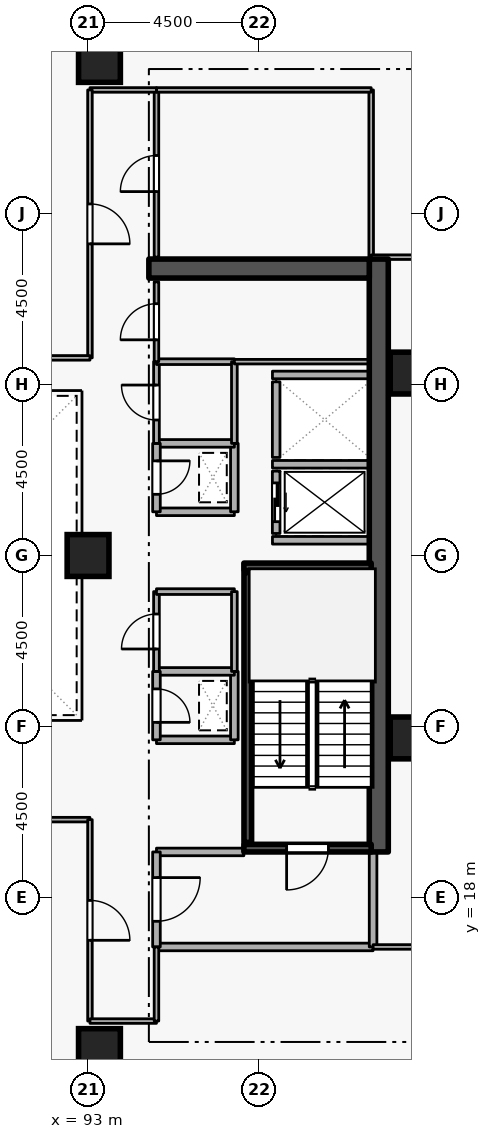
"""IFC4 building model, lengths in metres.
Left out: names, types, materials, properties, quantities, classifications, styles, units other than length and angle.
Written with IfcOpenShell. Run it as: python <this file> out.ifc"""

import sys

from ifc_helpers import new_model, si_unit, direction, frame, frame_2d, origin, origin_2d, place, context, subcontext, project, spatial, rectangle, extrude, element, fill, save


model = new_model("IFC4")
c1 = context("Model", 3, precision=1e-05, world=origin(), true_north=direction((0.0, 1.0)))
c2 = subcontext(c1, "Body", "Model", "MODEL_VIEW")
j1 = project(units=[si_unit("LENGTHUNIT", "METRE"), si_unit("PLANEANGLEUNIT", "RADIAN")], contexts=[c1])
p1 = place(None, origin())
s1 = spatial("IfcSite", under=j1, at=p1, CompositionType="ELEMENT")
p2 = place(p1, origin())
s2 = spatial("IfcBuilding", under=s1, at=p2, CompositionType="ELEMENT")
p3 = place(p2, frame((0.0, 0.0, 156.3)))
s3 = spatial("IfcBuildingStorey", under=s2, at=p3, CompositionType="ELEMENT", Elevation=156.3)
p4 = place(p3, frame((100.65, 19.2, 0.0), z_axis=(0.0, 0.0, 1.0), x_axis=(0.0, 1.0, 0.0)))
e1 = element("IfcWall", 1, at=p4, inside=s3, PredefinedType="SHEAR", context=c2, shape_type="SweptSolid", body=[
    extrude(rectangle(XDim=15.6, YDim=0.5, at=frame_2d((7.8, 0.0))), origin(), (0.0, 0.0, 1.0), 3.6),
])
p5 = place(p3, frame((94.6, 34.55, 0.0), z_axis=(0.0, 0.0, 1.0), x_axis=(1.0, 0.0, 0.0)))
e2 = element("IfcWall", 2, at=p5, inside=s3, PredefinedType="SHEAR", context=c2, shape_type="SweptSolid", body=[
    extrude(rectangle(XDim=5.8, YDim=0.5, at=frame_2d((2.9, 0.0))), origin(), (0.0, 0.0, 1.0), 3.6),
])
for number, where, z_axis, x_axis in (
    (3, (93.3, 14.0, 0.0), (0.0, 0.0, 1.0), (1.0, 0.0, 0.0)),
    (4, (93.3, 40.0, 0.0), (0.0, 0.0, 1.0), (1.0, 0.0, 0.0)),
    (5, (101.5, 22.2, 0.0), (0.0, 0.0, 1.0), (1.0, 0.0, 0.0)),
    (6, (101.5, 31.8, 0.0), (0.0, 0.0, 1.0), (1.0, 0.0, 0.0)),
    (7, (93.0, 27.0, 0.0), (0.0, 0.0, 1.0), (1.0, 0.0, 0.0)),
):
    element("IfcColumn", number, at=place(p3, frame(where, z_axis=z_axis, x_axis=x_axis)), inside=s3, PredefinedType="COLUMN", context=c2, shape_type="SweptSolid", body=[
        extrude(rectangle(XDim=1.1, YDim=1.1, at=origin_2d()), origin(), (0.0, 0.0, 1.0), 3.6),
    ])
p6 = place(p3, frame((97.95, 29.22, 0.0), z_axis=(0.0, 0.0, 1.0), x_axis=(0.0, -1.0, 0.0)))
e8 = element("IfcWall", 8, at=p6, inside=s3, PredefinedType="STANDARD", context=c2, shape_type="SweptSolid", body=[
    extrude(rectangle(XDim=1.64, YDim=0.2, at=frame_2d((0.82, 0.0))), origin(), (0.0, 0.0, 1.0), 3.34),
])
p7 = place(p6, frame((0.31, 0.0, 0.0)))
e9 = element("IfcOpeningElement", 9, at=p7, cuts=e8, PredefinedType="OPENING", context=c2, shape_type="SweptSolid", body=[
    extrude(rectangle(XDim=1.02, YDim=2.06, at=frame_2d((0.51, 1.03))), frame((0.0, 0.11, 0.0), z_axis=(0.0, -1.0, 0.0), x_axis=(1.0, 0.0, 0.0)), (0.0, 0.0, 1.0), 0.22),
])
p8 = place(p3, frame((97.95, 31.57, 0.0), z_axis=(0.0, 0.0, 1.0), x_axis=(0.0, -1.0, 0.0)))
e10 = element("IfcWall", 10, at=p8, inside=s3, PredefinedType="STANDARD", context=c2, shape_type="SweptSolid", body=[
    extrude(rectangle(XDim=1.99, YDim=0.2, at=frame_2d((0.995, 0.0))), origin(), (0.0, 0.0, 1.0), 3.34),
])
for number, where, z_axis, x_axis in (
    (11, (97.852, 29.4, 0.0), (0.0, 0.0, 1.0), (1.0, 0.0, 0.0)),
    (12, (97.852, 27.4, 0.0), (0.0, 0.0, 1.0), (1.0, 0.0, 0.0)),
    (13, (97.852, 31.75, 0.0), (0.0, 0.0, 1.0), (1.0, 0.0, 0.0)),
):
    element("IfcWall", number, at=place(p3, frame(where, z_axis=z_axis, x_axis=x_axis)), inside=s3, PredefinedType="STANDARD", context=c2, shape_type="SweptSolid", body=[
        extrude(rectangle(XDim=2.536, YDim=0.2, at=frame_2d((1.268, 0.0))), origin(), (0.0, 0.0, 1.0), 3.34),
    ])
p9 = place(p3, frame((100.45, 19.3, 0.0), z_axis=(0.0, 0.0, 1.0), x_axis=(-1.0, 0.0, 0.0)))
e14 = element("IfcWall", 14, at=p9, inside=s3, PredefinedType="SHEAR", context=c2, shape_type="SweptSolid", body=[
    extrude(rectangle(XDim=3.35, YDim=0.2, at=frame_2d((1.675, 0.0))), origin(), (0.0, 0.0, 1.0), 3.6),
])
p10 = place(p9, frame((1.125, 0.0, 0.0)))
e15 = element("IfcOpeningElement", 15, at=p10, cuts=e14, PredefinedType="OPENING", context=c2, shape_type="SweptSolid", body=[
    extrude(rectangle(XDim=1.1, YDim=2.1, at=frame_2d((0.55, 1.05))), frame((0.0, 0.11, 0.0), z_axis=(0.0, -1.0, 0.0), x_axis=(1.0, 0.0, 0.0)), (0.0, 0.0, 1.0), 0.22),
])
p11 = place(p3, frame((97.1, 26.7, 0.0), z_axis=(0.0, 0.0, 1.0), x_axis=(1.0, 0.0, 0.0)))
e16 = element("IfcWall", 16, at=p11, inside=s3, PredefinedType="SHEAR", context=c2, shape_type="SweptSolid", body=[
    extrude(rectangle(XDim=3.35, YDim=0.2, at=frame_2d((1.675, 0.0))), origin(), (0.0, 0.0, 1.0), 3.6),
])
p12 = place(p3, frame((97.203, 26.55, 0.0), z_axis=(0.0, 0.0, 1.0), x_axis=(0.0, -1.0, 0.0)))
e17 = element("IfcWall", 17, at=p12, inside=s3, PredefinedType="SHEAR", context=c2, shape_type="SweptSolid", body=[
    extrude(rectangle(XDim=7.1, YDim=0.2, at=frame_2d((3.55, 0.0))), origin(), (0.0, 0.0, 1.0), 3.6),
])
p13 = place(p3, frame((94.8, 16.7, 0.0), z_axis=(0.0, 0.0, 1.0), x_axis=(1.0, 0.0, 0.0)))
e18 = element("IfcWall", 18, at=p13, inside=s3, PredefinedType="STANDARD", context=c2, shape_type="SweptSolid", body=[
    extrude(rectangle(XDim=5.7, YDim=0.2, at=frame_2d((2.85, 0.0))), origin(), (0.0, 0.0, 1.0), 3.34),
])
p14 = place(p3, frame((100.5, 16.7, 0.0), z_axis=(0.0, 0.0, 1.0), x_axis=(0.0, 1.0, 0.0)))
e19 = element("IfcWall", 19, at=p14, inside=s3, PredefinedType="STANDARD", context=c2, shape_type="SweptSolid", body=[
    extrude(rectangle(XDim=2.5, YDim=0.2, at=frame_2d((1.25, 0.0))), origin(), (0.0, 0.0, 1.0), 3.34),
])
p15 = place(p3, frame((97.1, 19.2, 0.0), z_axis=(0.0, 0.0, 1.0), x_axis=(-1.0, 0.0, 0.0)))
e20 = element("IfcWall", 20, at=p15, inside=s3, PredefinedType="STANDARD", context=c2, shape_type="SweptSolid", body=[
    extrude(rectangle(XDim=2.3, YDim=0.2, at=frame_2d((1.15, 0.0))), origin(), (0.0, 0.0, 1.0), 2.545),
])
p16 = place(p3, frame((94.8, 19.2, 0.0), z_axis=(0.0, 0.0, 1.0), x_axis=(0.0, -1.0, 0.0)))
e21 = element("IfcWall", 21, at=p16, inside=s3, PredefinedType="STANDARD", context=c2, shape_type="SweptSolid", body=[
    extrude(rectangle(XDim=2.5, YDim=0.2, at=frame_2d((1.25, 0.0))), origin(), (0.0, 0.0, 1.0), 3.34),
])
p17 = place(p16, frame((0.675, 0.0, 0.0)))
e22 = element("IfcOpeningElement", 22, at=p17, cuts=e21, PredefinedType="OPENING", context=c2, shape_type="SweptSolid", body=[
    extrude(rectangle(XDim=1.15, YDim=2.1, at=frame_2d((0.575, 1.05))), frame((0.0, 0.11, 0.0), z_axis=(0.0, -1.0, 0.0), x_axis=(1.0, 0.0, 0.0)), (0.0, 0.0, 1.0), 0.22),
])
p18 = place(p3, frame((94.8, 28.15, 0.0), z_axis=(0.0, 0.0, 1.0), x_axis=(1.0, 0.0, 0.0)))
e23 = element("IfcWall", 23, at=p18, inside=s3, PredefinedType="STANDARD", context=c2, shape_type="SweptSolid", body=[
    extrude(rectangle(XDim=2.05, YDim=0.2, at=frame_2d((1.025, 0.0))), origin(), (0.0, 0.0, 1.0), 3.34),
])
p19 = place(p3, frame((96.85, 28.15, 0.0), z_axis=(0.0, 0.0, 1.0), x_axis=(0.0, 1.0, 0.0)))
e24 = element("IfcWall", 24, at=p19, inside=s3, PredefinedType="STANDARD", context=c2, shape_type="SweptSolid", body=[
    extrude(rectangle(XDim=1.8, YDim=0.2, at=frame_2d((0.9, 0.0))), origin(), (0.0, 0.0, 1.0), 3.34),
])
p20 = place(p3, frame((96.85, 29.95, 0.0), z_axis=(0.0, 0.0, 1.0), x_axis=(-1.0, 0.0, 0.0)))
e25 = element("IfcWall", 25, at=p20, inside=s3, PredefinedType="STANDARD", context=c2, shape_type="SweptSolid", body=[
    extrude(rectangle(XDim=2.05, YDim=0.2, at=frame_2d((1.025, 0.0))), origin(), (0.0, 0.0, 1.0), 3.34),
])
p21 = place(p3, frame((94.8, 29.95, 0.0), z_axis=(0.0, 0.0, 1.0), x_axis=(0.0, -1.0, 0.0)))
e26 = element("IfcWall", 26, at=p21, inside=s3, PredefinedType="STANDARD", context=c2, shape_type="SweptSolid", body=[
    extrude(rectangle(XDim=1.8, YDim=0.2, at=frame_2d((0.9, 0.0))), origin(), (0.0, 0.0, 1.0), 3.34),
])
p22 = place(p21, frame((0.46, 0.0, 0.0)))
e27 = element("IfcOpeningElement", 27, at=p22, cuts=e26, PredefinedType="OPENING", context=c2, shape_type="SweptSolid", body=[
    extrude(rectangle(XDim=0.88, YDim=2.04, at=frame_2d((0.44, 1.02))), frame((0.0, 0.11, 0.0), z_axis=(0.0, -1.0, 0.0), x_axis=(1.0, 0.0, 0.0)), (0.0, 0.0, 1.0), 0.22),
])
p23 = place(p3, frame((94.8, 22.15, 0.0), z_axis=(0.0, 0.0, 1.0), x_axis=(1.0, 0.0, 0.0)))
e28 = element("IfcWall", 28, at=p23, inside=s3, PredefinedType="STANDARD", context=c2, shape_type="SweptSolid", body=[
    extrude(rectangle(XDim=2.05, YDim=0.2, at=frame_2d((1.025, 0.0))), origin(), (0.0, 0.0, 1.0), 3.34),
])
p24 = place(p3, frame((96.85, 22.15, 0.0), z_axis=(0.0, 0.0, 1.0), x_axis=(0.0, 1.0, 0.0)))
e29 = element("IfcWall", 29, at=p24, inside=s3, PredefinedType="STANDARD", context=c2, shape_type="SweptSolid", body=[
    extrude(rectangle(XDim=1.8, YDim=0.2, at=frame_2d((0.9, 0.0))), origin(), (0.0, 0.0, 1.0), 3.34),
])
p25 = place(p3, frame((96.85, 23.95, 0.0), z_axis=(0.0, 0.0, 1.0), x_axis=(-1.0, 0.0, 0.0)))
e30 = element("IfcWall", 30, at=p25, inside=s3, PredefinedType="STANDARD", context=c2, shape_type="SweptSolid", body=[
    extrude(rectangle(XDim=2.05, YDim=0.2, at=frame_2d((1.025, 0.0))), origin(), (0.0, 0.0, 1.0), 3.34),
])
p26 = place(p3, frame((94.8, 23.95, 0.0), z_axis=(0.0, 0.0, 1.0), x_axis=(0.0, -1.0, 0.0)))
e31 = element("IfcWall", 31, at=p26, inside=s3, PredefinedType="STANDARD", context=c2, shape_type="SweptSolid", body=[
    extrude(rectangle(XDim=1.8, YDim=0.2, at=frame_2d((0.9, 0.0))), origin(), (0.0, 0.0, 1.0), 3.34),
])
p27 = place(p26, frame((0.46, 0.0, 0.0)))
e32 = element("IfcOpeningElement", 32, at=p27, cuts=e31, PredefinedType="OPENING", context=c2, shape_type="SweptSolid", body=[
    extrude(rectangle(XDim=0.88, YDim=2.04, at=frame_2d((0.44, 1.02))), frame((0.0, 0.11, 0.0), z_axis=(0.0, -1.0, 0.0), x_axis=(1.0, 0.0, 0.0)), (0.0, 0.0, 1.0), 0.22),
])
p28 = place(p3, frame((94.8, 23.95, 0.0), z_axis=(0.0, 0.0, 1.0), x_axis=(0.0, 1.0, 0.0)))
e33 = element("IfcWall", 33, at=p28, inside=s3, PredefinedType="PARTITIONING", context=c2, shape_type="SweptSolid", body=[
    extrude(rectangle(XDim=2.1, YDim=0.15, at=frame_2d((1.05, 0.0))), origin(), (0.0, 0.0, 1.0), 3.34),
])
p29 = place(p28, frame((0.59, 0.0, 0.0)))
e34 = element("IfcOpeningElement", 34, at=p29, cuts=e33, PredefinedType="OPENING", context=c2, shape_type="SweptSolid", body=[
    extrude(rectangle(XDim=0.92, YDim=2.08, at=frame_2d((0.46, 1.04))), frame((0.0, 0.085, 0.0), z_axis=(0.0, -1.0, 0.0), x_axis=(1.0, 0.0, 0.0)), (0.0, 0.0, 1.0), 0.17),
])
p30 = place(p3, frame((94.8, 26.05, 0.0), z_axis=(0.0, 0.0, 1.0), x_axis=(1.0, 0.0, 0.0)))
e35 = element("IfcWall", 35, at=p30, inside=s3, PredefinedType="PARTITIONING", context=c2, shape_type="SweptSolid", body=[
    extrude(rectangle(XDim=2.05, YDim=0.15, at=frame_2d((1.025, 0.0))), origin(), (0.0, 0.0, 1.0), 3.34),
])
p31 = place(p3, frame((96.85, 26.05, 0.0), z_axis=(0.0, 0.0, 1.0), x_axis=(0.0, -1.0, 0.0)))
e36 = element("IfcWall", 36, at=p31, inside=s3, PredefinedType="PARTITIONING", context=c2, shape_type="SweptSolid", body=[
    extrude(rectangle(XDim=2.1, YDim=0.15, at=frame_2d((1.05, 0.0))), origin(), (0.0, 0.0, 1.0), 3.34),
])
p32 = place(p3, frame((94.8, 29.95, 0.0), z_axis=(0.0, 0.0, 1.0), x_axis=(0.0, 1.0, 0.0)))
e37 = element("IfcWall", 37, at=p32, inside=s3, PredefinedType="PARTITIONING", context=c2, shape_type="SweptSolid", body=[
    extrude(rectangle(XDim=2.15, YDim=0.15, at=frame_2d((1.075, 0.0))), origin(), (0.0, 0.0, 1.0), 3.34),
])
p33 = place(p32, frame((0.615, 0.0, 0.0)))
e38 = element("IfcOpeningElement", 38, at=p33, cuts=e37, PredefinedType="OPENING", context=c2, shape_type="SweptSolid", body=[
    extrude(rectangle(XDim=0.92, YDim=2.08, at=frame_2d((0.46, 1.04))), frame((0.0, 0.085, 0.0), z_axis=(0.0, -1.0, 0.0), x_axis=(1.0, 0.0, 0.0)), (0.0, 0.0, 1.0), 0.17),
])
p34 = place(p3, frame((94.8, 32.1, 0.0), z_axis=(0.0, 0.0, 1.0), x_axis=(1.0, 0.0, 0.0)))
e39 = element("IfcWall", 39, at=p34, inside=s3, PredefinedType="PARTITIONING", context=c2, shape_type="SweptSolid", body=[
    extrude(rectangle(XDim=2.05, YDim=0.15, at=frame_2d((1.025, 0.0))), origin(), (0.0, 0.0, 1.0), 3.34),
])
p35 = place(p3, frame((96.85, 32.1, 0.0), z_axis=(0.0, 0.0, 1.0), x_axis=(0.0, -1.0, 0.0)))
e40 = element("IfcWall", 40, at=p35, inside=s3, PredefinedType="PARTITIONING", context=c2, shape_type="SweptSolid", body=[
    extrude(rectangle(XDim=2.15, YDim=0.15, at=frame_2d((1.075, 0.0))), origin(), (0.0, 0.0, 1.0), 3.34),
])
p36 = place(p3, frame((94.8, 32.1, 0.0), z_axis=(0.0, 0.0, 1.0), x_axis=(0.0, 1.0, 0.0)))
e41 = element("IfcWall", 41, at=p36, inside=s3, PredefinedType="PARTITIONING", context=c2, shape_type="SweptSolid", body=[
    extrude(rectangle(XDim=2.1, YDim=0.12, at=frame_2d((1.05, 0.0))), origin(), (0.0, 0.0, 1.0), 3.34),
])
p37 = place(p36, frame((0.575, 0.0, 0.0)))
e42 = element("IfcOpeningElement", 42, at=p37, cuts=e41, PredefinedType="OPENING", context=c2, shape_type="SweptSolid", body=[
    extrude(rectangle(XDim=0.95, YDim=2.1, at=frame_2d((0.475, 1.05))), frame((0.0, 0.07, 0.0), z_axis=(0.0, -1.0, 0.0), x_axis=(1.0, 0.0, 0.0)), (0.0, 0.0, 1.0), 0.14),
])
p38 = place(p3, frame((100.4, 32.1, 0.0), z_axis=(0.0, 0.0, 1.0), x_axis=(-1.0, 0.0, 0.0)))
e43 = element("IfcWall", 43, at=p38, inside=s3, PredefinedType="PARTITIONING", context=c2, shape_type="SweptSolid", body=[
    extrude(rectangle(XDim=3.55, YDim=0.12, at=frame_2d((1.775, 0.0))), origin(), (0.0, 0.0, 1.0), 3.34),
])
p39 = place(p3, frame((100.45, 39.25, 0.0), z_axis=(0.0, 0.0, 1.0), x_axis=(0.0, -1.0, 0.0)))
e44 = element("IfcWall", 44, at=p39, inside=s3, PredefinedType="PARTITIONING", context=c2, shape_type="SweptSolid", body=[
    extrude(rectangle(XDim=4.4, YDim=0.12, at=frame_2d((2.2, 0.0))), origin(), (0.0, 0.0, 1.0), 3.34),
])
p40 = place(p3, frame((94.8, 34.85, 0.0), z_axis=(0.0, 0.0, 1.0), x_axis=(0.0, 1.0, 0.0)))
e45 = element("IfcWall", 45, at=p40, inside=s3, PredefinedType="PARTITIONING", context=c2, shape_type="SweptSolid", body=[
    extrude(rectangle(XDim=4.4, YDim=0.12, at=frame_2d((2.2, 0.0))), origin(), (0.0, 0.0, 1.0), 3.34),
])
p41 = place(p40, frame((1.725, 0.0, 0.0)))
e46 = element("IfcOpeningElement", 46, at=p41, cuts=e45, PredefinedType="OPENING", context=c2, shape_type="SweptSolid", body=[
    extrude(rectangle(XDim=0.95, YDim=2.1, at=frame_2d((0.475, 1.05))), frame((0.0, 0.07, 0.0), z_axis=(0.0, -1.0, 0.0), x_axis=(1.0, 0.0, 0.0)), (0.0, 0.0, 1.0), 0.14),
])
p42 = place(p3, frame((94.8, 39.25, 0.0), z_axis=(0.0, 0.0, 1.0), x_axis=(1.0, 0.0, 0.0)))
e47 = element("IfcWall", 47, at=p42, inside=s3, PredefinedType="PARTITIONING", context=c2, shape_type="SweptSolid", body=[
    extrude(rectangle(XDim=5.65, YDim=0.12, at=frame_2d((2.825, 0.0))), origin(), (0.0, 0.0, 1.0), 3.34),
])
p43 = place(p3, frame((88.5, 20.05, 0.0), z_axis=(0.0, 0.0, 1.0), x_axis=(1.0, 0.0, 0.0)))
e48 = element("IfcWall", 48, at=p43, inside=s3, PredefinedType="PARTITIONING", context=c2, shape_type="SweptSolid", body=[
    extrude(rectangle(XDim=4.55, YDim=0.12, at=frame_2d((2.275, 0.0))), origin(), (0.0, 0.0, 1.0), 3.34),
])
p44 = place(p3, frame((93.05, 20.05, 0.0), z_axis=(0.0, 0.0, 1.0), x_axis=(0.0, -1.0, 0.0)))
e49 = element("IfcWall", 49, at=p44, inside=s3, PredefinedType="PARTITIONING", context=c2, shape_type="SweptSolid", body=[
    extrude(rectangle(XDim=5.3, YDim=0.12, at=frame_2d((2.65, 0.0))), origin(), (0.0, 0.0, 1.0), 3.34),
])
p45 = place(p44, frame((2.125, 0.0, 0.0)))
e50 = element("IfcOpeningElement", 50, at=p45, cuts=e49, PredefinedType="OPENING", context=c2, shape_type="SweptSolid", body=[
    extrude(rectangle(XDim=1.05, YDim=2.1, at=frame_2d((0.525, 1.05))), frame((0.0, 0.07, 0.0), z_axis=(0.0, -1.0, 0.0), x_axis=(1.0, 0.0, 0.0)), (0.0, 0.0, 1.0), 0.14),
])
p46 = place(p3, frame((93.05, 14.75, 0.0), z_axis=(0.0, 0.0, 1.0), x_axis=(1.0, 0.0, 0.0)))
e51 = element("IfcWall", 51, at=p46, inside=s3, PredefinedType="PARTITIONING", context=c2, shape_type="SweptSolid", body=[
    extrude(rectangle(XDim=1.75, YDim=0.12, at=frame_2d((0.875, 0.0))), origin(), (0.0, 0.0, 1.0), 3.34),
])
p47 = place(p3, frame((94.8, 14.75, 0.0), z_axis=(0.0, 0.0, 1.0), x_axis=(0.0, 1.0, 0.0)))
e52 = element("IfcWall", 52, at=p47, inside=s3, PredefinedType="PARTITIONING", context=c2, shape_type="SweptSolid", body=[
    extrude(rectangle(XDim=1.95, YDim=0.12, at=frame_2d((0.975, 0.0))), origin(), (0.0, 0.0, 1.0), 3.34),
])
p48 = place(p3, frame((100.5, 16.7, 0.0), z_axis=(0.0, 0.0, 1.0), x_axis=(1.0, 0.0, 0.0)))
e53 = element("IfcWall", 53, at=p48, inside=s3, PredefinedType="PARTITIONING", context=c2, shape_type="SweptSolid", body=[
    extrude(rectangle(XDim=11.72, YDim=0.12, at=frame_2d((5.86, 0.0))), origin(), (0.0, 0.0, 1.0), 3.34),
])
p49 = place(p3, frame((94.8, 39.25, 0.0), z_axis=(0.0, 0.0, 1.0), x_axis=(-1.0, 0.0, 0.0)))
e54 = element("IfcWall", 54, at=p49, inside=s3, PredefinedType="PARTITIONING", context=c2, shape_type="SweptSolid", body=[
    extrude(rectangle(XDim=1.75, YDim=0.12, at=frame_2d((0.875, 0.0))), origin(), (0.0, 0.0, 1.0), 3.34),
])
p50 = place(p3, frame((93.05, 39.25, 0.0), z_axis=(0.0, 0.0, 1.0), x_axis=(0.0, -1.0, 0.0)))
e55 = element("IfcWall", 55, at=p50, inside=s3, PredefinedType="PARTITIONING", context=c2, shape_type="SweptSolid", body=[
    extrude(rectangle(XDim=7.05, YDim=0.12, at=frame_2d((3.525, 0.0))), origin(), (0.0, 0.0, 1.0), 3.34),
])
p51 = place(p50, frame((3.0, 0.0, 0.0)))
e56 = element("IfcOpeningElement", 56, at=p51, cuts=e55, PredefinedType="OPENING", context=c2, shape_type="SweptSolid", body=[
    extrude(rectangle(XDim=1.05, YDim=2.1, at=frame_2d((0.525, 1.05))), frame((0.0, 0.07, 0.0), z_axis=(0.0, -1.0, 0.0), x_axis=(1.0, 0.0, 0.0)), (0.0, 0.0, 1.0), 0.14),
])
p52 = place(p3, frame((93.05, 32.2, 0.0), z_axis=(0.0, 0.0, 1.0), x_axis=(-1.0, 0.0, 0.0)))
e57 = element("IfcWall", 57, at=p52, inside=s3, PredefinedType="PARTITIONING", context=c2, shape_type="SweptSolid", body=[
    extrude(rectangle(XDim=4.55, YDim=0.12, at=frame_2d((2.275, 0.0))), origin(), (0.0, 0.0, 1.0), 3.34),
])
p53 = place(p3, frame((112.22, 34.85, 0.0), z_axis=(0.0, 0.0, 1.0), x_axis=(-1.0, 0.0, 0.0)))
e58 = element("IfcWall", 58, at=p53, inside=s3, PredefinedType="PARTITIONING", context=c2, shape_type="SweptSolid", body=[
    extrude(rectangle(XDim=11.77, YDim=0.12, at=frame_2d((5.885, 0.0))), origin(), (0.0, 0.0, 1.0), 2.545),
])
p54 = place(p7, origin())
e59 = element("IfcDoor", 59, at=p54, inside=s3, OperationType="SLIDING_TO_LEFT", PredefinedType="DOOR", context=c2, shape_type="SweptSolid", body=[
    extrude(rectangle(XDim=1.02, YDim=2.06, at=frame_2d((0.51, 1.03))), frame((0.0, 0.025, 0.0), z_axis=(0.0, -1.0, 0.0), x_axis=(1.0, 0.0, 0.0)), (0.0, 0.0, 1.0), 0.05),
])
fill(e9, e59)
p55 = place(p10, origin())
e60 = element("IfcDoor", 60, at=p55, inside=s3, OperationType="SINGLE_SWING_RIGHT", PredefinedType="DOOR", context=c2, shape_type="SweptSolid", body=[
    extrude(rectangle(XDim=1.1, YDim=2.1, at=frame_2d((0.55, 1.05))), frame((0.0, 0.025, 0.0), z_axis=(0.0, -1.0, 0.0), x_axis=(1.0, 0.0, 0.0)), (0.0, 0.0, 1.0), 0.05),
])
fill(e15, e60)
p56 = place(p17, origin())
e61 = element("IfcDoor", 61, at=p56, inside=s3, OperationType="SINGLE_SWING_LEFT", PredefinedType="DOOR", context=c2, shape_type="SweptSolid", body=[
    extrude(rectangle(XDim=1.15, YDim=2.1, at=frame_2d((0.575, 1.05))), frame((0.0, 0.025, 0.0), z_axis=(0.0, -1.0, 0.0), x_axis=(1.0, 0.0, 0.0)), (0.0, 0.0, 1.0), 0.05),
])
fill(e22, e61)
p57 = place(p22, origin())
e62 = element("IfcDoor", 62, at=p57, inside=s3, OperationType="SINGLE_SWING_LEFT", PredefinedType="DOOR", context=c2, shape_type="SweptSolid", body=[
    extrude(rectangle(XDim=0.88, YDim=2.04, at=frame_2d((0.44, 1.02))), frame((0.0, 0.025, 0.0), z_axis=(0.0, -1.0, 0.0), x_axis=(1.0, 0.0, 0.0)), (0.0, 0.0, 1.0), 0.05),
])
fill(e27, e62)
p58 = place(p27, origin())
e63 = element("IfcDoor", 63, at=p58, inside=s3, OperationType="SINGLE_SWING_RIGHT", PredefinedType="DOOR", context=c2, shape_type="SweptSolid", body=[
    extrude(rectangle(XDim=0.88, YDim=2.04, at=frame_2d((0.44, 1.02))), frame((0.0, 0.025, 0.0), z_axis=(0.0, -1.0, 0.0), x_axis=(1.0, 0.0, 0.0)), (0.0, 0.0, 1.0), 0.05),
])
fill(e32, e63)
p59 = place(p29, origin())
e64 = element("IfcDoor", 64, at=p59, inside=s3, OperationType="SINGLE_SWING_LEFT", PredefinedType="DOOR", context=c2, shape_type="SweptSolid", body=[
    extrude(rectangle(XDim=0.92, YDim=2.08, at=frame_2d((0.46, 1.04))), frame((0.0, 0.025, 0.0), z_axis=(0.0, -1.0, 0.0), x_axis=(1.0, 0.0, 0.0)), (0.0, 0.0, 1.0), 0.05),
])
fill(e34, e64)
p60 = place(p33, origin())
e65 = element("IfcDoor", 65, at=p60, inside=s3, OperationType="SINGLE_SWING_RIGHT", PredefinedType="DOOR", context=c2, shape_type="SweptSolid", body=[
    extrude(rectangle(XDim=0.92, YDim=2.08, at=frame_2d((0.46, 1.04))), frame((0.0, 0.025, 0.0), z_axis=(0.0, -1.0, 0.0), x_axis=(1.0, 0.0, 0.0)), (0.0, 0.0, 1.0), 0.05),
])
fill(e38, e65)
p61 = place(p37, origin())
e66 = element("IfcDoor", 66, at=p61, inside=s3, OperationType="SINGLE_SWING_LEFT", PredefinedType="DOOR", context=c2, shape_type="SweptSolid", body=[
    extrude(rectangle(XDim=0.95, YDim=2.1, at=frame_2d((0.475, 1.05))), frame((0.0, 0.025, 0.0), z_axis=(0.0, -1.0, 0.0), x_axis=(1.0, 0.0, 0.0)), (0.0, 0.0, 1.0), 0.05),
])
fill(e42, e66)
p62 = place(p41, origin())
e67 = element("IfcDoor", 67, at=p62, inside=s3, OperationType="SINGLE_SWING_LEFT", PredefinedType="DOOR", context=c2, shape_type="SweptSolid", body=[
    extrude(rectangle(XDim=0.95, YDim=2.1, at=frame_2d((0.475, 1.05))), frame((0.0, 0.025, 0.0), z_axis=(0.0, -1.0, 0.0), x_axis=(1.0, 0.0, 0.0)), (0.0, 0.0, 1.0), 0.05),
])
fill(e46, e67)
p63 = place(p45, origin())
e68 = element("IfcDoor", 68, at=p63, inside=s3, OperationType="SINGLE_SWING_RIGHT", PredefinedType="DOOR", context=c2, shape_type="SweptSolid", body=[
    extrude(rectangle(XDim=1.05, YDim=2.1, at=frame_2d((0.525, 1.05))), frame((0.0, 0.025, 0.0), z_axis=(0.0, -1.0, 0.0), x_axis=(1.0, 0.0, 0.0)), (0.0, 0.0, 1.0), 0.05),
])
fill(e50, e68)
p64 = place(p51, origin())
e69 = element("IfcDoor", 69, at=p64, inside=s3, OperationType="SINGLE_SWING_RIGHT", PredefinedType="DOOR", context=c2, shape_type="SweptSolid", body=[
    extrude(rectangle(XDim=1.05, YDim=2.1, at=frame_2d((0.525, 1.05))), frame((0.0, 0.025, 0.0), z_axis=(0.0, -1.0, 0.0), x_axis=(1.0, 0.0, 0.0)), (0.0, 0.0, 1.0), 0.05),
])
fill(e56, e69)
save(model, sys.argv[1])
